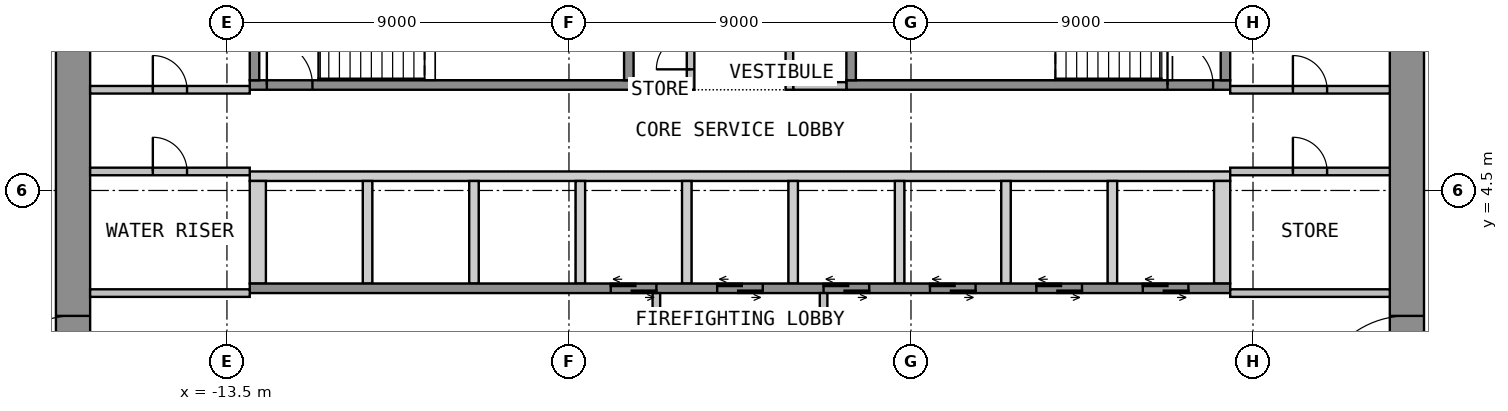
"""IFC4 building model, lengths in metres.
Left out: names, types, materials, properties, quantities, classifications, styles, units other than length and angle.
Written with IfcOpenShell. Run it as: python <this file> out.ifc"""

import sys

from ifc_helpers import new_model, si_unit, direction, frame, frame_2d, origin, place, context, subcontext, project, spatial, polyline, rectangle, outline, extrude, element, fill, save


model = new_model("IFC4")
c1 = context("Model", 3, precision=1e-05, world=origin(), true_north=direction((0.0, 1.0)))
c2 = subcontext(c1, "Body", "Model", "MODEL_VIEW")
j1 = project(units=[si_unit("LENGTHUNIT", "METRE"), si_unit("PLANEANGLEUNIT", "RADIAN")], contexts=[c1])
p1 = place(None, origin())
s1 = spatial("IfcSite", under=j1, at=p1, CompositionType="ELEMENT")
p2 = place(p1, origin())
s2 = spatial("IfcBuilding", under=s1, at=p2, CompositionType="ELEMENT")
p3 = place(p2, frame((0.0, 0.0, 30.0)))
s3 = spatial("IfcBuildingStorey", under=s2, at=p3, CompositionType="ELEMENT", Elevation=30.0)
p4 = place(p3, frame((-17.55, -12.6, 0.0), z_axis=(0.0, 0.0, 1.0), x_axis=(0.0, 1.0, 0.0)))
e1 = element("IfcWall", 1, at=p4, inside=s3, PredefinedType="SHEAR", context=c2, shape_type="SweptSolid", body=[
    extrude(rectangle(XDim=25.2, YDim=0.9, at=frame_2d((12.6, 0.0))), origin(), (0.0, 0.0, 1.0), 3.525),
])
p5 = place(p4, frame((11.4, 0.0, 0.0)))
e2 = element("IfcOpeningElement", 2, at=p5, cuts=e1, PredefinedType="OPENING", context=c2, shape_type="SweptSolid", body=[
    extrude(rectangle(XDim=2.4, YDim=2.1, at=frame_2d((1.2, 1.05))), frame((0.0, 0.46, 0.0), z_axis=(0.0, -1.0, 0.0), x_axis=(1.0, 0.0, 0.0)), (0.0, 0.0, 1.0), 0.92),
])
p6 = place(p3, frame((17.55, -12.6, 0.0), z_axis=(0.0, 0.0, 1.0), x_axis=(0.0, 1.0, 0.0)))
e3 = element("IfcWall", 3, at=p6, inside=s3, PredefinedType="SHEAR", context=c2, shape_type="SweptSolid", body=[
    extrude(rectangle(XDim=25.2, YDim=0.9, at=frame_2d((12.6, 0.0))), origin(), (0.0, 0.0, 1.0), 3.525),
])
p7 = place(p6, frame((11.4, 0.0, 0.0)))
e4 = element("IfcOpeningElement", 4, at=p7, cuts=e3, PredefinedType="OPENING", context=c2, shape_type="SweptSolid", body=[
    extrude(rectangle(XDim=2.4, YDim=2.1, at=frame_2d((1.2, 1.05))), frame((0.0, 0.46, 0.0), z_axis=(0.0, -1.0, 0.0), x_axis=(1.0, 0.0, 0.0)), (0.0, 0.0, 1.0), 0.92),
])
p8 = place(p3, origin())
e5 = element("IfcWall", 5, at=p8, inside=s3, PredefinedType="SHEAR", context=c2, shape_type="SweptSolid", body=[
    extrude(outline(polyline([(-12.9, 4.75), (12.9, 4.75), (12.9, 5.0), (-12.9, 5.0), (-12.9, 4.75)])), origin(), (0.0, 0.0, 1.0), 3.525),
])
p9 = place(p3, origin())
e6 = element("IfcWall", 6, at=p9, inside=s3, PredefinedType="SHEAR", context=c2, shape_type="SweptSolid", body=[
    extrude(outline(polyline([(-12.9, 2.05), (-12.475, 2.05), (-12.475, 4.75), (-12.9, 4.75), (-12.9, 2.05)])), origin(), (0.0, 0.0, 1.0), 3.525),
])
p10 = place(p3, origin())
e7 = element("IfcWall", 7, at=p10, inside=s3, PredefinedType="SHEAR", context=c2, shape_type="SweptSolid", body=[
    extrude(outline(polyline([(-9.925, 2.05), (-9.675, 2.05), (-9.675, 4.75), (-9.925, 4.75), (-9.925, 2.05)])), origin(), (0.0, 0.0, 1.0), 3.525),
])
p11 = place(p3, origin())
e8 = element("IfcWall", 8, at=p11, inside=s3, PredefinedType="SHEAR", context=c2, shape_type="SweptSolid", body=[
    extrude(outline(polyline([(-7.125, 2.05), (-6.875, 2.05), (-6.875, 4.75), (-7.125, 4.75), (-7.125, 2.05)])), origin(), (0.0, 0.0, 1.0), 3.525),
])
p12 = place(p3, origin())
e9 = element("IfcWall", 9, at=p12, inside=s3, PredefinedType="SHEAR", context=c2, shape_type="SweptSolid", body=[
    extrude(outline(polyline([(-4.325, 2.05), (-4.075, 2.05), (-4.075, 4.75), (-4.325, 4.75), (-4.325, 2.05)])), origin(), (0.0, 0.0, 1.0), 3.525),
])
p13 = place(p3, origin())
e10 = element("IfcWall", 10, at=p13, inside=s3, PredefinedType="SHEAR", context=c2, shape_type="SweptSolid", body=[
    extrude(outline(polyline([(-1.525, 2.05), (-1.275, 2.05), (-1.275, 4.75), (-1.525, 4.75), (-1.525, 2.05)])), origin(), (0.0, 0.0, 1.0), 3.525),
])
p14 = place(p3, origin())
e11 = element("IfcWall", 11, at=p14, inside=s3, PredefinedType="SHEAR", context=c2, shape_type="SweptSolid", body=[
    extrude(outline(polyline([(1.275, 2.05), (1.525, 2.05), (1.525, 4.75), (1.275, 4.75), (1.275, 2.05)])), origin(), (0.0, 0.0, 1.0), 3.525),
])
p15 = place(p3, origin())
e12 = element("IfcWall", 12, at=p15, inside=s3, PredefinedType="SHEAR", context=c2, shape_type="SweptSolid", body=[
    extrude(outline(polyline([(4.075, 2.05), (4.325, 2.05), (4.325, 4.75), (4.075, 4.75), (4.075, 2.05)])), origin(), (0.0, 0.0, 1.0), 3.525),
])
p16 = place(p3, origin())
e13 = element("IfcWall", 13, at=p16, inside=s3, PredefinedType="SHEAR", context=c2, shape_type="SweptSolid", body=[
    extrude(outline(polyline([(6.875, 2.05), (7.125, 2.05), (7.125, 4.75), (6.875, 4.75), (6.875, 2.05)])), origin(), (0.0, 0.0, 1.0), 3.525),
])
p17 = place(p3, origin())
e14 = element("IfcWall", 14, at=p17, inside=s3, PredefinedType="SHEAR", context=c2, shape_type="SweptSolid", body=[
    extrude(outline(polyline([(9.675, 2.05), (9.925, 2.05), (9.925, 4.75), (9.675, 4.75), (9.675, 2.05)])), origin(), (0.0, 0.0, 1.0), 3.525),
])
p18 = place(p3, origin())
e15 = element("IfcWall", 15, at=p18, inside=s3, PredefinedType="SHEAR", context=c2, shape_type="SweptSolid", body=[
    extrude(outline(polyline([(12.475, 2.05), (12.9, 2.05), (12.9, 4.75), (12.475, 4.75), (12.475, 2.05)])), origin(), (0.0, 0.0, 1.0), 3.525),
])
p19 = place(p3, frame((-12.9, 1.925, 0.0), z_axis=(0.0, 0.0, 1.0), x_axis=(1.0, 0.0, 0.0)))
e16 = element("IfcWall", 16, at=p19, inside=s3, PredefinedType="SHEAR", context=c2, shape_type="SweptSolid", body=[
    extrude(rectangle(XDim=25.8, YDim=0.25, at=frame_2d((12.9, 0.0))), origin(), (0.0, 0.0, 1.0), 3.525),
])
p20 = place(p19, frame((9.5, 0.0, 0.0)))
e17 = element("IfcOpeningElement", 17, at=p20, cuts=e16, PredefinedType="OPENING", context=c2, shape_type="SweptSolid", body=[
    extrude(rectangle(XDim=1.2, YDim=2.1, at=frame_2d((0.6, 1.05))), frame((0.0, 0.135, 0.0), z_axis=(0.0, -1.0, 0.0), x_axis=(1.0, 0.0, 0.0)), (0.0, 0.0, 1.0), 0.27),
])
p21 = place(p19, frame((12.3, 0.0, 0.0)))
e18 = element("IfcOpeningElement", 18, at=p21, cuts=e16, PredefinedType="OPENING", context=c2, shape_type="SweptSolid", body=[
    extrude(rectangle(XDim=1.2, YDim=2.1, at=frame_2d((0.6, 1.05))), frame((0.0, 0.135, 0.0), z_axis=(0.0, -1.0, 0.0), x_axis=(1.0, 0.0, 0.0)), (0.0, 0.0, 1.0), 0.27),
])
p22 = place(p19, frame((15.1, 0.0, 0.0)))
e19 = element("IfcOpeningElement", 19, at=p22, cuts=e16, PredefinedType="OPENING", context=c2, shape_type="SweptSolid", body=[
    extrude(rectangle(XDim=1.2, YDim=2.1, at=frame_2d((0.6, 1.05))), frame((0.0, 0.135, 0.0), z_axis=(0.0, -1.0, 0.0), x_axis=(1.0, 0.0, 0.0)), (0.0, 0.0, 1.0), 0.27),
])
p23 = place(p19, frame((17.9, 0.0, 0.0)))
e20 = element("IfcOpeningElement", 20, at=p23, cuts=e16, PredefinedType="OPENING", context=c2, shape_type="SweptSolid", body=[
    extrude(rectangle(XDim=1.2, YDim=2.1, at=frame_2d((0.6, 1.05))), frame((0.0, 0.135, 0.0), z_axis=(0.0, -1.0, 0.0), x_axis=(1.0, 0.0, 0.0)), (0.0, 0.0, 1.0), 0.27),
])
p24 = place(p19, frame((20.7, 0.0, 0.0)))
e21 = element("IfcOpeningElement", 21, at=p24, cuts=e16, PredefinedType="OPENING", context=c2, shape_type="SweptSolid", body=[
    extrude(rectangle(XDim=1.2, YDim=2.1, at=frame_2d((0.6, 1.05))), frame((0.0, 0.135, 0.0), z_axis=(0.0, -1.0, 0.0), x_axis=(1.0, 0.0, 0.0)), (0.0, 0.0, 1.0), 0.27),
])
p25 = place(p19, frame((23.5, 0.0, 0.0)))
e22 = element("IfcOpeningElement", 22, at=p25, cuts=e16, PredefinedType="OPENING", context=c2, shape_type="SweptSolid", body=[
    extrude(rectangle(XDim=1.2, YDim=2.1, at=frame_2d((0.6, 1.05))), frame((0.0, 0.135, 0.0), z_axis=(0.0, -1.0, 0.0), x_axis=(1.0, 0.0, 0.0)), (0.0, 0.0, 1.0), 0.27),
])
p26 = place(p3, frame((-2.2, -1.8, 0.0), z_axis=(0.0, 0.0, 1.0), x_axis=(0.0, 1.0, 0.0)))
e23 = element("IfcWall", 23, at=p26, inside=s3, PredefinedType="PARTITIONING", context=c2, shape_type="SweptSolid", body=[
    extrude(rectangle(XDim=3.6, YDim=0.2, at=frame_2d((1.8, 0.0))), origin(), (0.0, 0.0, 1.0), 3.525),
])
p27 = place(p26, frame((1.2, 0.0, 0.0)))
e24 = element("IfcOpeningElement", 24, at=p27, cuts=e23, PredefinedType="OPENING", context=c2, shape_type="SweptSolid", body=[
    extrude(rectangle(XDim=1.2, YDim=2.1, at=frame_2d((0.6, 1.05))), frame((0.0, 0.11, 0.0), z_axis=(0.0, -1.0, 0.0), x_axis=(1.0, 0.0, 0.0)), (0.0, 0.0, 1.0), 0.22),
])
p28 = place(p3, frame((2.2, -1.8, 0.0), z_axis=(0.0, 0.0, 1.0), x_axis=(0.0, 1.0, 0.0)))
e25 = element("IfcWall", 25, at=p28, inside=s3, PredefinedType="PARTITIONING", context=c2, shape_type="SweptSolid", body=[
    extrude(rectangle(XDim=3.6, YDim=0.2, at=frame_2d((1.8, 0.0))), origin(), (0.0, 0.0, 1.0), 3.525),
])
p29 = place(p28, frame((1.2, 0.0, 0.0)))
e26 = element("IfcOpeningElement", 26, at=p29, cuts=e25, PredefinedType="OPENING", context=c2, shape_type="SweptSolid", body=[
    extrude(rectangle(XDim=1.2, YDim=2.1, at=frame_2d((0.6, 1.05))), frame((0.0, 0.11, 0.0), z_axis=(0.0, -1.0, 0.0), x_axis=(1.0, 0.0, 0.0)), (0.0, 0.0, 1.0), 0.22),
])
p30 = place(p3, frame((-12.9, 7.275, 0.0), z_axis=(0.0, 0.0, 1.0), x_axis=(1.0, 0.0, 0.0)))
e27 = element("IfcWall", 27, at=p30, inside=s3, PredefinedType="SHEAR", context=c2, shape_type="SweptSolid", body=[
    extrude(rectangle(XDim=10.1, YDim=0.25, at=frame_2d((5.05, 0.0))), origin(), (0.0, 0.0, 1.0), 3.525),
])
p31 = place(p30, frame((0.45, 0.0, 0.0)))
e28 = element("IfcOpeningElement", 28, at=p31, cuts=e27, PredefinedType="OPENING", context=c2, shape_type="SweptSolid", body=[
    extrude(rectangle(XDim=1.2, YDim=2.1, at=frame_2d((0.6, 1.05))), frame((0.0, 0.135, 0.0), z_axis=(0.0, -1.0, 0.0), x_axis=(1.0, 0.0, 0.0)), (0.0, 0.0, 1.0), 0.27),
])
for number, where, z_axis, x_axis in (
    (29, (-12.775, 7.4, 0.0), (0.0, 0.0, 1.0), (0.0, 1.0, 0.0)),
    (30, (-2.925, 7.4, 0.0), (0.0, 0.0, 1.0), (0.0, 1.0, 0.0)),
):
    element("IfcWall", number, at=place(p3, frame(where, z_axis=z_axis, x_axis=x_axis)), inside=s3, PredefinedType="SHEAR", context=c2, shape_type="SweptSolid", body=[
        extrude(rectangle(XDim=3.25, YDim=0.25, at=frame_2d((1.625, 0.0))), origin(), (0.0, 0.0, 1.0), 3.525),
    ])
p32 = place(p3, frame((2.8, 7.275, 0.0), z_axis=(0.0, 0.0, 1.0), x_axis=(1.0, 0.0, 0.0)))
e31 = element("IfcWall", 31, at=p32, inside=s3, PredefinedType="SHEAR", context=c2, shape_type="SweptSolid", body=[
    extrude(rectangle(XDim=10.1, YDim=0.25, at=frame_2d((5.05, 0.0))), origin(), (0.0, 0.0, 1.0), 3.525),
])
p33 = place(p32, frame((8.45, 0.0, 0.0)))
e32 = element("IfcOpeningElement", 32, at=p33, cuts=e31, PredefinedType="OPENING", context=c2, shape_type="SweptSolid", body=[
    extrude(rectangle(XDim=1.2, YDim=2.1, at=frame_2d((0.6, 1.05))), frame((0.0, 0.135, 0.0), z_axis=(0.0, -1.0, 0.0), x_axis=(1.0, 0.0, 0.0)), (0.0, 0.0, 1.0), 0.27),
])
for number, where, z_axis, x_axis in (
    (33, (2.925, 7.4, 0.0), (0.0, 0.0, 1.0), (0.0, 1.0, 0.0)),
    (34, (12.775, 7.4, 0.0), (0.0, 0.0, 1.0), (0.0, 1.0, 0.0)),
):
    element("IfcWall", number, at=place(p3, frame(where, z_axis=z_axis, x_axis=x_axis)), inside=s3, PredefinedType="SHEAR", context=c2, shape_type="SweptSolid", body=[
        extrude(rectangle(XDim=3.25, YDim=0.25, at=frame_2d((1.625, 0.0))), origin(), (0.0, 0.0, 1.0), 3.525),
    ])
for number, where, z_axis, x_axis in (
    (35, (-2.8, 7.25, 0.0), (0.0, 0.0, 1.0), (1.0, 0.0, 0.0)),
    (36, (1.4, 7.25, 0.0), (0.0, 0.0, 1.0), (1.0, 0.0, 0.0)),
):
    element("IfcWall", number, at=place(p3, frame(where, z_axis=z_axis, x_axis=x_axis)), inside=s3, PredefinedType="PARTITIONING", context=c2, shape_type="SweptSolid", body=[
        extrude(rectangle(XDim=1.4, YDim=0.2, at=frame_2d((0.7, 0.0))), origin(), (0.0, 0.0, 1.0), 3.525),
    ])
p34 = place(p3, frame((-1.3, 7.15, 0.0), z_axis=(0.0, 0.0, 1.0), x_axis=(0.0, 1.0, 0.0)))
e37 = element("IfcWall", 37, at=p34, inside=s3, PredefinedType="PARTITIONING", context=c2, shape_type="SweptSolid", body=[
    extrude(rectangle(XDim=5.45, YDim=0.2, at=frame_2d((2.725, 0.0))), origin(), (0.0, 0.0, 1.0), 3.525),
])
p35 = place(p34, frame((0.538, 0.0, 0.0)))
e38 = element("IfcOpeningElement", 38, at=p35, cuts=e37, PredefinedType="OPENING", context=c2, shape_type="SweptSolid", body=[
    extrude(rectangle(XDim=0.9, YDim=2.1, at=frame_2d((0.45, 1.05))), frame((0.0, 0.11, 0.0), z_axis=(0.0, -1.0, 0.0), x_axis=(1.0, 0.0, 0.0)), (0.0, 0.0, 1.0), 0.22),
])
p36 = place(p34, frame((3.163, 0.0, 0.0)))
e39 = element("IfcOpeningElement", 39, at=p36, cuts=e37, PredefinedType="OPENING", context=c2, shape_type="SweptSolid", body=[
    extrude(rectangle(XDim=0.9, YDim=2.1, at=frame_2d((0.45, 1.05))), frame((0.0, 0.11, 0.0), z_axis=(0.0, -1.0, 0.0), x_axis=(1.0, 0.0, 0.0)), (0.0, 0.0, 1.0), 0.22),
])
p37 = place(p3, frame((1.3, 7.15, 0.0), z_axis=(0.0, 0.0, 1.0), x_axis=(0.0, 1.0, 0.0)))
e40 = element("IfcWall", 40, at=p37, inside=s3, PredefinedType="PARTITIONING", context=c2, shape_type="SweptSolid", body=[
    extrude(rectangle(XDim=5.45, YDim=0.2, at=frame_2d((2.725, 0.0))), origin(), (0.0, 0.0, 1.0), 3.525),
])
p38 = place(p37, frame((1.062, 0.0, 0.0)))
e41 = element("IfcOpeningElement", 41, at=p38, cuts=e40, PredefinedType="OPENING", context=c2, shape_type="SweptSolid", body=[
    extrude(rectangle(XDim=0.9, YDim=2.1, at=frame_2d((0.45, 1.05))), frame((0.0, 0.11, 0.0), z_axis=(0.0, -1.0, 0.0), x_axis=(1.0, 0.0, 0.0)), (0.0, 0.0, 1.0), 0.22),
])
p39 = place(p37, frame((3.688, 0.0, 0.0)))
e42 = element("IfcOpeningElement", 42, at=p39, cuts=e40, PredefinedType="OPENING", context=c2, shape_type="SweptSolid", body=[
    extrude(rectangle(XDim=0.9, YDim=2.1, at=frame_2d((0.45, 1.05))), frame((0.0, 0.11, 0.0), z_axis=(0.0, -1.0, 0.0), x_axis=(1.0, 0.0, 0.0)), (0.0, 0.0, 1.0), 0.22),
])
p40 = place(p3, frame((-17.1, 7.15, 0.0), z_axis=(0.0, 0.0, 1.0), x_axis=(1.0, 0.0, 0.0)))
e43 = element("IfcWall", 43, at=p40, inside=s3, PredefinedType="PARTITIONING", context=c2, shape_type="SweptSolid", body=[
    extrude(rectangle(XDim=4.2, YDim=0.2, at=frame_2d((2.1, 0.0))), origin(), (0.0, 0.0, 1.0), 3.525),
])
p41 = place(p40, frame((1.65, 0.0, 0.0)))
e44 = element("IfcOpeningElement", 44, at=p41, cuts=e43, PredefinedType="OPENING", context=c2, shape_type="SweptSolid", body=[
    extrude(rectangle(XDim=0.9, YDim=2.1, at=frame_2d((0.45, 1.05))), frame((0.0, 0.11, 0.0), z_axis=(0.0, -1.0, 0.0), x_axis=(1.0, 0.0, 0.0)), (0.0, 0.0, 1.0), 0.22),
])
p42 = place(p3, frame((-17.1, 5.0, 0.0), z_axis=(0.0, 0.0, 1.0), x_axis=(1.0, 0.0, 0.0)))
e45 = element("IfcWall", 45, at=p42, inside=s3, PredefinedType="PARTITIONING", context=c2, shape_type="SweptSolid", body=[
    extrude(rectangle(XDim=4.2, YDim=0.2, at=frame_2d((2.1, 0.0))), origin(), (0.0, 0.0, 1.0), 3.525),
])
p43 = place(p42, frame((1.65, 0.0, 0.0)))
e46 = element("IfcOpeningElement", 46, at=p43, cuts=e45, PredefinedType="OPENING", context=c2, shape_type="SweptSolid", body=[
    extrude(rectangle(XDim=0.9, YDim=2.1, at=frame_2d((0.45, 1.05))), frame((0.0, 0.11, 0.0), z_axis=(0.0, -1.0, 0.0), x_axis=(1.0, 0.0, 0.0)), (0.0, 0.0, 1.0), 0.22),
])
p44 = place(p3, frame((-17.1, 1.8, 0.0), z_axis=(0.0, 0.0, 1.0), x_axis=(1.0, 0.0, 0.0)))
e47 = element("IfcWall", 47, at=p44, inside=s3, PredefinedType="PARTITIONING", context=c2, shape_type="SweptSolid", body=[
    extrude(rectangle(XDim=4.2, YDim=0.2, at=frame_2d((2.1, 0.0))), origin(), (0.0, 0.0, 1.0), 3.525),
])
p45 = place(p3, frame((12.9, 7.15, 0.0), z_axis=(0.0, 0.0, 1.0), x_axis=(1.0, 0.0, 0.0)))
e48 = element("IfcWall", 48, at=p45, inside=s3, PredefinedType="PARTITIONING", context=c2, shape_type="SweptSolid", body=[
    extrude(rectangle(XDim=4.2, YDim=0.2, at=frame_2d((2.1, 0.0))), origin(), (0.0, 0.0, 1.0), 3.525),
])
p46 = place(p45, frame((1.65, 0.0, 0.0)))
e49 = element("IfcOpeningElement", 49, at=p46, cuts=e48, PredefinedType="OPENING", context=c2, shape_type="SweptSolid", body=[
    extrude(rectangle(XDim=0.9, YDim=2.1, at=frame_2d((0.45, 1.05))), frame((0.0, 0.11, 0.0), z_axis=(0.0, -1.0, 0.0), x_axis=(1.0, 0.0, 0.0)), (0.0, 0.0, 1.0), 0.22),
])
p47 = place(p3, frame((12.9, 5.0, 0.0), z_axis=(0.0, 0.0, 1.0), x_axis=(1.0, 0.0, 0.0)))
e50 = element("IfcWall", 50, at=p47, inside=s3, PredefinedType="PARTITIONING", context=c2, shape_type="SweptSolid", body=[
    extrude(rectangle(XDim=4.2, YDim=0.2, at=frame_2d((2.1, 0.0))), origin(), (0.0, 0.0, 1.0), 3.525),
])
p48 = place(p47, frame((1.65, 0.0, 0.0)))
e51 = element("IfcOpeningElement", 51, at=p48, cuts=e50, PredefinedType="OPENING", context=c2, shape_type="SweptSolid", body=[
    extrude(rectangle(XDim=0.9, YDim=2.1, at=frame_2d((0.45, 1.05))), frame((0.0, 0.11, 0.0), z_axis=(0.0, -1.0, 0.0), x_axis=(1.0, 0.0, 0.0)), (0.0, 0.0, 1.0), 0.22),
])
p49 = place(p3, frame((12.9, 1.8, 0.0), z_axis=(0.0, 0.0, 1.0), x_axis=(1.0, 0.0, 0.0)))
e52 = element("IfcWall", 52, at=p49, inside=s3, PredefinedType="PARTITIONING", context=c2, shape_type="SweptSolid", body=[
    extrude(rectangle(XDim=4.2, YDim=0.2, at=frame_2d((2.1, 0.0))), origin(), (0.0, 0.0, 1.0), 3.525),
])
p50 = place(p5, origin())
e53 = element("IfcDoor", 53, at=p50, inside=s3, OperationType="DOUBLE_DOOR_DOUBLE_SWING", PredefinedType="DOOR", context=c2, shape_type="SweptSolid", body=[
    extrude(rectangle(XDim=2.4, YDim=2.1, at=frame_2d((1.2, 1.05))), frame((0.0, 0.025, 0.0), z_axis=(0.0, -1.0, 0.0), x_axis=(1.0, 0.0, 0.0)), (0.0, 0.0, 1.0), 0.05),
])
fill(e2, e53)
p51 = place(p7, origin())
e54 = element("IfcDoor", 54, at=p51, inside=s3, OperationType="DOUBLE_DOOR_DOUBLE_SWING", PredefinedType="DOOR", context=c2, shape_type="SweptSolid", body=[
    extrude(rectangle(XDim=2.4, YDim=2.1, at=frame_2d((1.2, 1.05))), frame((0.0, 0.025, 0.0), z_axis=(0.0, -1.0, 0.0), x_axis=(1.0, 0.0, 0.0)), (0.0, 0.0, 1.0), 0.05),
])
fill(e4, e54)
p52 = place(p20, origin())
e55 = element("IfcDoor", 55, at=p52, inside=s3, OperationType="DOUBLE_DOOR_SLIDING", PredefinedType="DOOR", context=c2, shape_type="SweptSolid", body=[
    extrude(rectangle(XDim=1.2, YDim=2.1, at=frame_2d((0.6, 1.05))), frame((0.0, 0.025, 0.0), z_axis=(0.0, -1.0, 0.0), x_axis=(1.0, 0.0, 0.0)), (0.0, 0.0, 1.0), 0.05),
])
fill(e17, e55)
p53 = place(p21, origin())
e56 = element("IfcDoor", 56, at=p53, inside=s3, OperationType="DOUBLE_DOOR_SLIDING", PredefinedType="DOOR", context=c2, shape_type="SweptSolid", body=[
    extrude(rectangle(XDim=1.2, YDim=2.1, at=frame_2d((0.6, 1.05))), frame((0.0, 0.025, 0.0), z_axis=(0.0, -1.0, 0.0), x_axis=(1.0, 0.0, 0.0)), (0.0, 0.0, 1.0), 0.05),
])
fill(e18, e56)
p54 = place(p22, origin())
e57 = element("IfcDoor", 57, at=p54, inside=s3, OperationType="DOUBLE_DOOR_SLIDING", PredefinedType="DOOR", context=c2, shape_type="SweptSolid", body=[
    extrude(rectangle(XDim=1.2, YDim=2.1, at=frame_2d((0.6, 1.05))), frame((0.0, 0.025, 0.0), z_axis=(0.0, -1.0, 0.0), x_axis=(1.0, 0.0, 0.0)), (0.0, 0.0, 1.0), 0.05),
])
fill(e19, e57)
p55 = place(p23, origin())
e58 = element("IfcDoor", 58, at=p55, inside=s3, OperationType="DOUBLE_DOOR_SLIDING", PredefinedType="DOOR", context=c2, shape_type="SweptSolid", body=[
    extrude(rectangle(XDim=1.2, YDim=2.1, at=frame_2d((0.6, 1.05))), frame((0.0, 0.025, 0.0), z_axis=(0.0, -1.0, 0.0), x_axis=(1.0, 0.0, 0.0)), (0.0, 0.0, 1.0), 0.05),
])
fill(e20, e58)
p56 = place(p24, origin())
e59 = element("IfcDoor", 59, at=p56, inside=s3, OperationType="DOUBLE_DOOR_SLIDING", PredefinedType="DOOR", context=c2, shape_type="SweptSolid", body=[
    extrude(rectangle(XDim=1.2, YDim=2.1, at=frame_2d((0.6, 1.05))), frame((0.0, 0.025, 0.0), z_axis=(0.0, -1.0, 0.0), x_axis=(1.0, 0.0, 0.0)), (0.0, 0.0, 1.0), 0.05),
])
fill(e21, e59)
p57 = place(p25, origin())
e60 = element("IfcDoor", 60, at=p57, inside=s3, OperationType="DOUBLE_DOOR_SLIDING", PredefinedType="DOOR", context=c2, shape_type="SweptSolid", body=[
    extrude(rectangle(XDim=1.2, YDim=2.1, at=frame_2d((0.6, 1.05))), frame((0.0, 0.025, 0.0), z_axis=(0.0, -1.0, 0.0), x_axis=(1.0, 0.0, 0.0)), (0.0, 0.0, 1.0), 0.05),
])
fill(e22, e60)
p58 = place(p31, origin())
e61 = element("IfcDoor", 61, at=p58, inside=s3, OperationType="SINGLE_SWING_LEFT", PredefinedType="DOOR", context=c2, shape_type="SweptSolid", body=[
    extrude(rectangle(XDim=1.2, YDim=2.1, at=frame_2d((0.6, 1.05))), frame((0.0, 0.025, 0.0), z_axis=(0.0, -1.0, 0.0), x_axis=(1.0, 0.0, 0.0)), (0.0, 0.0, 1.0), 0.05),
])
fill(e28, e61)
p59 = place(p33, origin())
e62 = element("IfcDoor", 62, at=p59, inside=s3, OperationType="SINGLE_SWING_LEFT", PredefinedType="DOOR", context=c2, shape_type="SweptSolid", body=[
    extrude(rectangle(XDim=1.2, YDim=2.1, at=frame_2d((0.6, 1.05))), frame((0.0, 0.025, 0.0), z_axis=(0.0, -1.0, 0.0), x_axis=(1.0, 0.0, 0.0)), (0.0, 0.0, 1.0), 0.05),
])
fill(e32, e62)
p60 = place(p35, origin())
e63 = element("IfcDoor", 63, at=p60, inside=s3, OperationType="SINGLE_SWING_LEFT", PredefinedType="DOOR", context=c2, shape_type="SweptSolid", body=[
    extrude(rectangle(XDim=0.9, YDim=2.1, at=frame_2d((0.45, 1.05))), frame((0.0, 0.025, 0.0), z_axis=(0.0, -1.0, 0.0), x_axis=(1.0, 0.0, 0.0)), (0.0, 0.0, 1.0), 0.05),
])
fill(e38, e63)
p61 = place(p41, origin())
e64 = element("IfcDoor", 64, at=p61, inside=s3, OperationType="SINGLE_SWING_LEFT", PredefinedType="DOOR", context=c2, shape_type="SweptSolid", body=[
    extrude(rectangle(XDim=0.9, YDim=2.1, at=frame_2d((0.45, 1.05))), frame((0.0, 0.025, 0.0), z_axis=(0.0, -1.0, 0.0), x_axis=(1.0, 0.0, 0.0)), (0.0, 0.0, 1.0), 0.05),
])
fill(e44, e64)
p62 = place(p43, origin())
e65 = element("IfcDoor", 65, at=p62, inside=s3, OperationType="SINGLE_SWING_LEFT", PredefinedType="DOOR", context=c2, shape_type="SweptSolid", body=[
    extrude(rectangle(XDim=0.9, YDim=2.1, at=frame_2d((0.45, 1.05))), frame((0.0, 0.025, 0.0), z_axis=(0.0, -1.0, 0.0), x_axis=(1.0, 0.0, 0.0)), (0.0, 0.0, 1.0), 0.05),
])
fill(e46, e65)
p63 = place(p46, origin())
e66 = element("IfcDoor", 66, at=p63, inside=s3, OperationType="SINGLE_SWING_LEFT", PredefinedType="DOOR", context=c2, shape_type="SweptSolid", body=[
    extrude(rectangle(XDim=0.9, YDim=2.1, at=frame_2d((0.45, 1.05))), frame((0.0, 0.025, 0.0), z_axis=(0.0, -1.0, 0.0), x_axis=(1.0, 0.0, 0.0)), (0.0, 0.0, 1.0), 0.05),
])
fill(e49, e66)
p64 = place(p48, origin())
e67 = element("IfcDoor", 67, at=p64, inside=s3, OperationType="SINGLE_SWING_LEFT", PredefinedType="DOOR", context=c2, shape_type="SweptSolid", body=[
    extrude(rectangle(XDim=0.9, YDim=2.1, at=frame_2d((0.45, 1.05))), frame((0.0, 0.025, 0.0), z_axis=(0.0, -1.0, 0.0), x_axis=(1.0, 0.0, 0.0)), (0.0, 0.0, 1.0), 0.05),
])
fill(e51, e67)
save(model, sys.argv[1])
